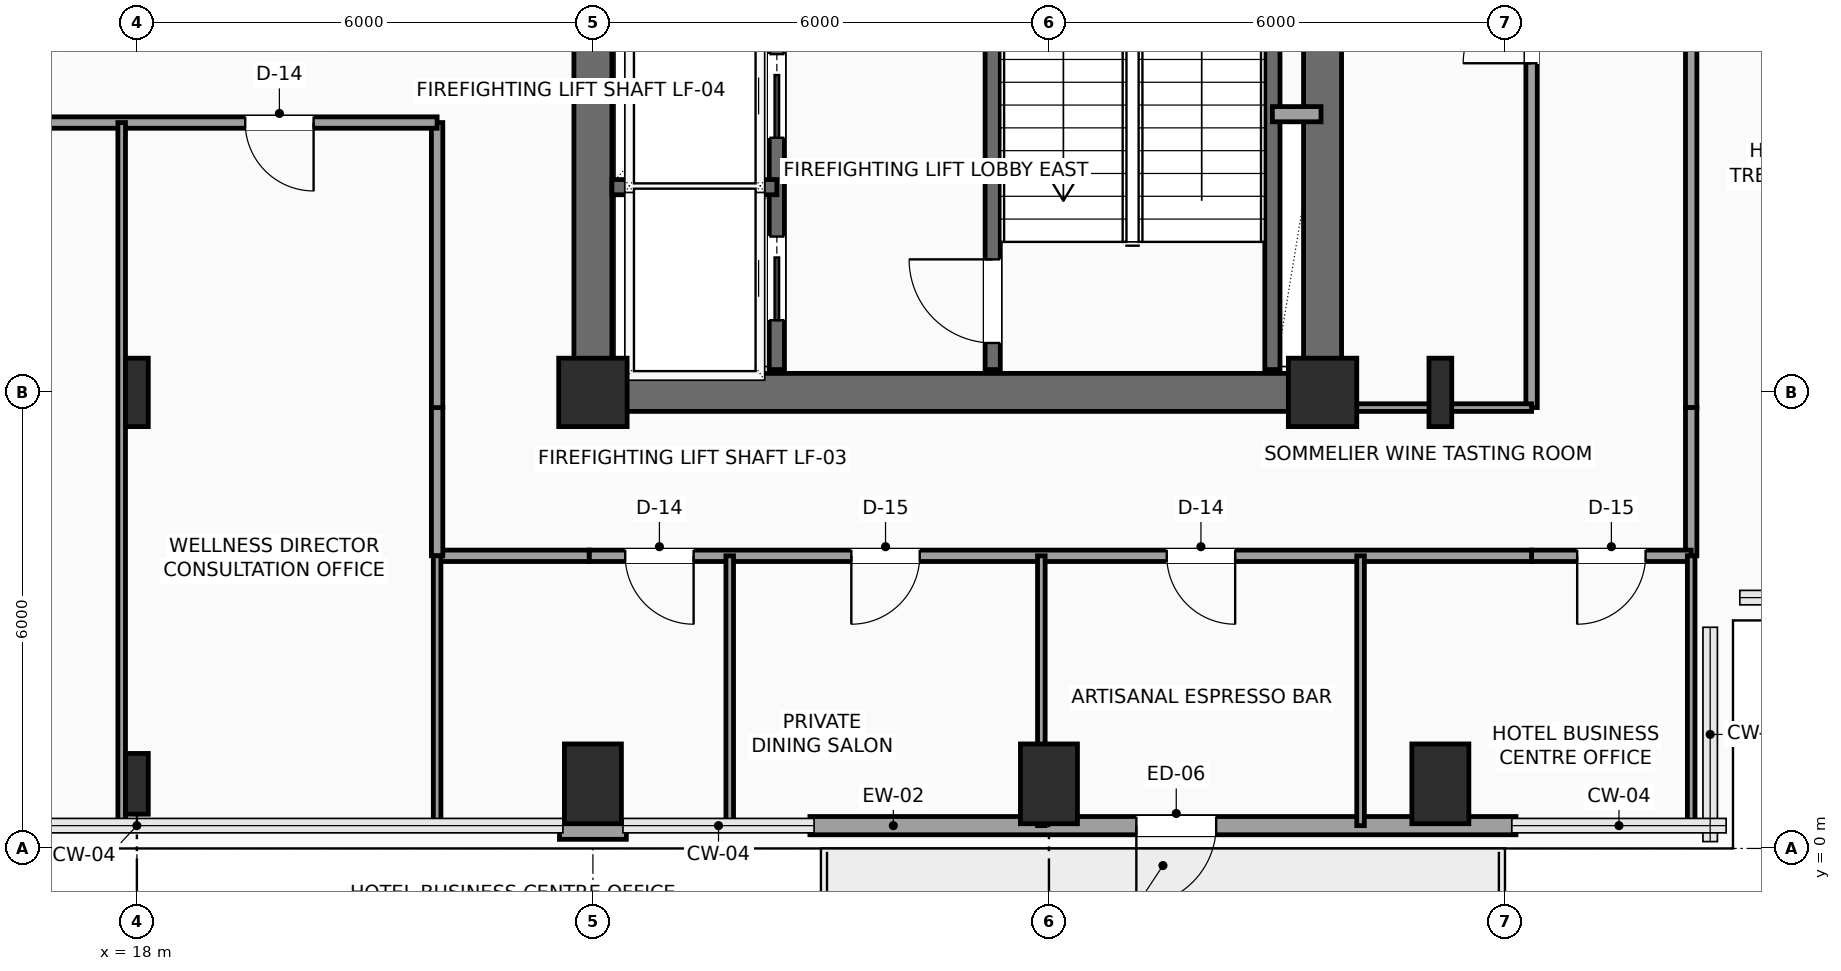
"""IFC4 building model, lengths in metres.
Left out: names, types, materials, properties, quantities, classifications, styles, units other than length and angle.
Written with IfcOpenShell. Run it as: python <this file> out.ifc"""

import sys

from ifc_helpers import new_model, si_unit, direction, frame, frame_2d, origin, origin_2d, place, context, subcontext, project, spatial, rectangle, i_section, extrude, element, fill, save


model = new_model("IFC4")
c1 = context("Model", 3, precision=1e-05, world=origin(), true_north=direction((0.0, 1.0)))
c2 = subcontext(c1, "Body", "Model", "MODEL_VIEW")
j1 = project(units=[si_unit("LENGTHUNIT", "METRE"), si_unit("PLANEANGLEUNIT", "RADIAN")], contexts=[c1])
p1 = place(None, origin())
s1 = spatial("IfcSite", under=j1, at=p1, CompositionType="ELEMENT")
p2 = place(p1, origin())
s2 = spatial("IfcBuilding", under=s1, at=p2, CompositionType="ELEMENT")
p3 = place(p2, frame((0.0, 0.0, 195.45)))
s3 = spatial("IfcBuildingStorey", under=s2, at=p3, CompositionType="ELEMENT", Elevation=195.45)
for number, where, z_axis, x_axis in (
    (1, (24.0, 6.0, 0.0), (0.0, 0.0, 1.0), (1.0, 0.0, 0.0)),
    (2, (33.6, 6.0, 0.0), (0.0, 0.0, 1.0), (1.0, 0.0, 0.0)),
):
    element("IfcColumn", number, at=place(p3, frame(where, z_axis=z_axis, x_axis=x_axis)), inside=s3, PredefinedType="COLUMN", context=c2, shape_type="SweptSolid", body=[
        extrude(rectangle(XDim=0.9, YDim=0.9, at=origin_2d()), origin(), (0.0, 0.0, 1.0), 3.75),
    ])
p4 = place(p3, frame((18.0, 0.85, 0.0), z_axis=(0.0, 0.0, 1.0), x_axis=(1.0, 0.0, 0.0)))
e3 = element("IfcColumn", 3, at=p4, inside=s3, PredefinedType="COLUMN", context=c2, shape_type="SweptSolid", body=[
    extrude(i_section(OverallWidth=0.3, OverallDepth=0.8, WebThickness=0.018, FlangeThickness=0.033, FilletRadius=0.03, at=origin_2d()), origin(), (0.0, 0.0, 1.0), 3.75),
])
p5 = place(p3, frame((18.0, 6.0, 0.0), z_axis=(0.0, 0.0, 1.0), x_axis=(1.0, 0.0, 0.0)))
e4 = element("IfcColumn", 4, at=p5, inside=s3, PredefinedType="COLUMN", context=c2, shape_type="SweptSolid", body=[
    extrude(i_section(OverallWidth=0.3, OverallDepth=0.9, WebThickness=0.019, FlangeThickness=0.035, FilletRadius=0.03, at=origin_2d()), origin(), (0.0, 0.0, 1.0), 3.75),
])
for number, where, z_axis, x_axis in (
    (5, (24.0, 0.85, 0.0), (0.0, 0.0, 1.0), (1.0, 0.0, 0.0)),
    (6, (30.0, 0.85, 0.0), (0.0, 0.0, 1.0), (1.0, 0.0, 0.0)),
    (7, (35.15, 0.85, 0.0), (0.0, 0.0, 1.0), (1.0, 0.0, 0.0)),
):
    element("IfcColumn", number, at=place(p3, frame(where, z_axis=z_axis, x_axis=x_axis)), inside=s3, PredefinedType="COLUMN", context=c2, shape_type="SweptSolid", body=[
        extrude(rectangle(XDim=0.75, YDim=1.05, at=origin_2d()), origin(), (0.0, 0.0, 1.0), 3.75),
    ])
p6 = place(p3, frame((35.15, 6.0, 0.0), z_axis=(0.0, 0.0, 1.0), x_axis=(1.0, 0.0, 0.0)))
e8 = element("IfcColumn", 8, at=p6, inside=s3, PredefinedType="COLUMN", context=c2, shape_type="SweptSolid", body=[
    extrude(i_section(OverallWidth=0.3, OverallDepth=0.9, WebThickness=0.019, FlangeThickness=0.035, FilletRadius=0.03, at=origin_2d()), origin(), (0.0, 0.0, 1.0), 3.75),
])
p7 = place(p3, frame((36.145, 0.3, 0.0), z_axis=(0.0, 0.0, 1.0), x_axis=(-1.0, 0.0, 0.0)))
e9 = element("IfcWall", 9, at=p7, inside=s3, PredefinedType="SOLIDWALL", context=c2, shape_type="SweptSolid", body=[
    extrude(rectangle(XDim=9.29, YDim=0.24, at=frame_2d((4.645, 0.0))), origin(), (0.0, 0.0, 1.0), 3.475),
])
p8 = place(p7, frame((3.945, 0.0, 0.0)))
e10 = element("IfcOpeningElement", 10, at=p8, cuts=e9, PredefinedType="OPENING", context=c2, shape_type="SweptSolid", body=[
    extrude(rectangle(XDim=1.05, YDim=2.2, at=frame_2d((0.525, 1.1))), frame((0.0, 0.13, 0.0), z_axis=(0.0, -1.0, 0.0), x_axis=(1.0, 0.0, 0.0)), (0.0, 0.0, 1.0), 0.26),
])
p9 = place(p3, frame((24.44, 0.24, 0.0), z_axis=(0.0, 0.0, 1.0), x_axis=(-1.0, 0.0, 0.0)))
e11 = element("IfcWall", 11, at=p9, inside=s3, PredefinedType="SOLIDWALL", context=c2, shape_type="SweptSolid", body=[
    extrude(rectangle(XDim=0.88, YDim=0.24, at=frame_2d((0.44, 0.0))), origin(), (0.0, 0.0, 1.0), 3.475),
])
p10 = place(p3, frame((24.0, 6.0, 0.0), z_axis=(0.0, 0.0, 1.0), x_axis=(1.0, 0.0, 0.0)))
e12 = element("IfcWall", 12, at=p10, inside=s3, PredefinedType="SHEAR", context=c2, shape_type="SweptSolid", body=[
    extrude(rectangle(XDim=9.6, YDim=0.5, at=frame_2d((4.8, 0.0))), origin(), (0.0, 0.0, 1.0), 3.475),
])
p11 = place(p3, frame((24.0, 6.0, 0.0), z_axis=(0.0, 0.0, 1.0), x_axis=(0.0, 1.0, 0.0)))
e13 = element("IfcWall", 13, at=p11, inside=s3, PredefinedType="SHEAR", context=c2, shape_type="SweptSolid", body=[
    extrude(rectangle(XDim=12.0, YDim=0.5, at=frame_2d((6.0, 0.0))), origin(), (0.0, 0.0, 1.0), 3.475),
])
p12 = place(p11, frame((7.15, 0.0, 0.0)))
e14 = element("IfcOpeningElement", 14, at=p12, cuts=e13, PredefinedType="OPENING", context=c2, shape_type="SweptSolid", body=[
    extrude(rectangle(XDim=1.6, YDim=2.3, at=frame_2d((0.8, 1.15))), frame((0.0, 0.26, 0.0), z_axis=(0.0, -1.0, 0.0), x_axis=(1.0, 0.0, 0.0)), (0.0, 0.0, 1.0), 0.52),
])
p13 = place(p3, frame((33.6, 6.0, 0.0), z_axis=(0.0, 0.0, 1.0), x_axis=(0.0, 1.0, 0.0)))
e15 = element("IfcWall", 15, at=p13, inside=s3, PredefinedType="SHEAR", context=c2, shape_type="SweptSolid", body=[
    extrude(rectangle(XDim=12.0, YDim=0.5, at=frame_2d((6.0, 0.0))), origin(), (0.0, 0.0, 1.0), 3.475),
])
p14 = place(p13, frame((10.2, 0.0, 0.0)))
e16 = element("IfcOpeningElement", 16, at=p14, cuts=e15, PredefinedType="OPENING", context=c2, shape_type="SweptSolid", body=[
    extrude(rectangle(XDim=0.9, YDim=2.15, at=frame_2d((0.45, 1.075))), frame((0.0, 0.26, 0.0), z_axis=(0.0, -1.0, 0.0), x_axis=(1.0, 0.0, 0.0)), (0.0, 0.0, 1.0), 0.52),
])
p15 = place(p3, frame((29.26, 6.3, 0.0), z_axis=(0.0, 0.0, 1.0), x_axis=(0.0, 1.0, 0.0)))
e17 = element("IfcWall", 17, at=p15, inside=s3, PredefinedType="SHEAR", context=c2, shape_type="SweptSolid", body=[
    extrude(rectangle(XDim=8.88, YDim=0.2, at=frame_2d((4.44, 0.0))), origin(), (0.0, 0.0, 1.0), 3.475),
])
p16 = place(p15, frame((0.35, 0.0, 0.0)))
e18 = element("IfcOpeningElement", 18, at=p16, cuts=e17, PredefinedType="OPENING", context=c2, shape_type="SweptSolid", body=[
    extrude(rectangle(XDim=1.1, YDim=2.2, at=frame_2d((0.55, 1.1))), frame((0.0, 0.11, 0.0), z_axis=(0.0, -1.0, 0.0), x_axis=(1.0, 0.0, 0.0)), (0.0, 0.0, 1.0), 0.22),
])
p17 = place(p3, frame((32.94, 6.3, 0.0), z_axis=(0.0, 0.0, 1.0), x_axis=(0.0, 1.0, 0.0)))
e19 = element("IfcWall", 19, at=p17, inside=s3, PredefinedType="SHEAR", context=c2, shape_type="SweptSolid", body=[
    extrude(rectangle(XDim=8.88, YDim=0.2, at=frame_2d((4.44, 0.0))), origin(), (0.0, 0.0, 1.0), 3.475),
])
p18 = place(p3, frame((26.42, 6.3, 0.0), z_axis=(0.0, 0.0, 1.0), x_axis=(0.0, 1.0, 0.0)))
e20 = element("IfcWall", 20, at=p18, inside=s3, PredefinedType="SHEAR", context=c2, shape_type="SweptSolid", body=[
    extrude(rectangle(XDim=4.95, YDim=0.2, at=frame_2d((2.475, 0.0))), origin(), (0.0, 0.0, 1.0), 3.475),
])
p19 = place(p18, frame((0.65, 0.0, 0.0)))
e21 = element("IfcOpeningElement", 21, at=p19, cuts=e20, PredefinedType="OPENING", context=c2, shape_type="SweptSolid", body=[
    extrude(rectangle(XDim=1.1, YDim=2.2, at=frame_2d((0.55, 1.1))), frame((0.0, 0.11, 0.0), z_axis=(0.0, -1.0, 0.0), x_axis=(1.0, 0.0, 0.0)), (0.0, 0.0, 1.0), 0.22),
])
p20 = place(p18, frame((3.05, 0.0, 0.0)))
e22 = element("IfcOpeningElement", 22, at=p20, cuts=e20, PredefinedType="OPENING", context=c2, shape_type="SweptSolid", body=[
    extrude(rectangle(XDim=1.1, YDim=2.2, at=frame_2d((0.55, 1.1))), frame((0.0, 0.11, 0.0), z_axis=(0.0, -1.0, 0.0), x_axis=(1.0, 0.0, 0.0)), (0.0, 0.0, 1.0), 0.22),
])
p21 = place(p3, frame((24.25, 8.7, 0.0), z_axis=(0.0, 0.0, 1.0), x_axis=(1.0, 0.0, 0.0)))
e23 = element("IfcWall", 23, at=p21, inside=s3, PredefinedType="SHEAR", context=c2, shape_type="SweptSolid", body=[
    extrude(rectangle(XDim=2.17, YDim=0.2, at=frame_2d((1.085, 0.0))), origin(), (0.0, 0.0, 1.0), 3.475),
])
p22 = place(p3, frame((32.94, 9.66, 0.0), z_axis=(0.0, 0.0, 1.0), x_axis=(1.0, 0.0, 0.0)))
e24 = element("IfcWall", 24, at=p22, inside=s3, PredefinedType="SOLIDWALL", context=c2, shape_type="SweptSolid", body=[
    extrude(rectangle(XDim=0.64, YDim=0.2, at=frame_2d((0.32, 0.0))), origin(), (0.0, 0.0, 1.0), 3.475),
])
p23 = place(p3, frame((36.35, 5.8, 0.0), z_axis=(0.0, 0.0, 1.0), x_axis=(0.0, 1.0, 0.0)))
e25 = element("IfcWall", 25, at=p23, inside=s3, PredefinedType="PARTITIONING", context=c2, shape_type="SweptSolid", body=[
    extrude(rectangle(XDim=10.08, YDim=0.15, at=frame_2d((5.04, 0.0))), origin(), (0.0, 0.0, 1.0), 3.475),
])
p24 = place(p23, frame((4.53, 0.0, 0.0)))
e26 = element("IfcOpeningElement", 26, at=p24, cuts=e25, PredefinedType="OPENING", context=c2, shape_type="SweptSolid", body=[
    extrude(rectangle(XDim=0.9, YDim=2.1, at=frame_2d((0.45, 1.05))), frame((0.0, 0.085, 0.0), z_axis=(0.0, -1.0, 0.0), x_axis=(1.0, 0.0, 0.0)), (0.0, 0.0, 1.0), 0.17),
])
p25 = place(p3, frame((38.45, 14.2, 0.0), z_axis=(0.0, 0.0, 1.0), x_axis=(0.0, -1.0, 0.0)))
e27 = element("IfcWall", 27, at=p25, inside=s3, PredefinedType="PARTITIONING", context=c2, shape_type="SweptSolid", body=[
    extrude(rectangle(XDim=8.4, YDim=0.15, at=frame_2d((4.2, 0.0))), origin(), (0.0, 0.0, 1.0), 3.475),
])
p26 = place(p3, frame((38.45, 5.8, 0.0), z_axis=(0.0, 0.0, 1.0), x_axis=(0.0, -1.0, 0.0)))
e28 = element("IfcWall", 28, at=p26, inside=s3, PredefinedType="PARTITIONING", context=c2, shape_type="SweptSolid", body=[
    extrude(rectangle(XDim=1.95, YDim=0.15, at=frame_2d((0.975, 0.0))), origin(), (0.0, 0.0, 1.0), 3.475),
])
p27 = place(p3, frame((38.45, 3.85, 0.0), z_axis=(0.0, 0.0, 1.0), x_axis=(-1.0, 0.0, 0.0)))
e29 = element("IfcWall", 29, at=p27, inside=s3, PredefinedType="PARTITIONING", context=c2, shape_type="SweptSolid", body=[
    extrude(rectangle(XDim=2.1, YDim=0.15, at=frame_2d((1.05, 0.0))), origin(), (0.0, 0.0, 1.0), 3.475),
])
p28 = place(p27, frame((0.6, 0.0, 0.0)))
e30 = element("IfcOpeningElement", 30, at=p28, cuts=e29, PredefinedType="OPENING", context=c2, shape_type="SweptSolid", body=[
    extrude(rectangle(XDim=0.9, YDim=2.1, at=frame_2d((0.45, 1.05))), frame((0.0, 0.085, 0.0), z_axis=(0.0, -1.0, 0.0), x_axis=(1.0, 0.0, 0.0)), (0.0, 0.0, 1.0), 0.17),
])
p29 = place(p3, frame((36.35, 3.85, 0.0), z_axis=(0.0, 0.0, 1.0), x_axis=(-1.0, 0.0, 0.0)))
e31 = element("IfcWall", 31, at=p29, inside=s3, PredefinedType="PARTITIONING", context=c2, shape_type="SweptSolid", body=[
    extrude(rectangle(XDim=12.4, YDim=0.15, at=frame_2d((6.2, 0.0))), origin(), (0.0, 0.0, 1.0), 3.475),
])
p30 = place(p29, frame((11.025, 0.0, 0.0)))
e32 = element("IfcOpeningElement", 32, at=p30, cuts=e31, PredefinedType="OPENING", context=c2, shape_type="SweptSolid", body=[
    extrude(rectangle(XDim=0.9, YDim=2.1, at=frame_2d((0.45, 1.05))), frame((0.0, 0.085, 0.0), z_axis=(0.0, -1.0, 0.0), x_axis=(1.0, 0.0, 0.0)), (0.0, 0.0, 1.0), 0.17),
])
p31 = place(p29, frame((8.05, 0.0, 0.0)))
e33 = element("IfcOpeningElement", 33, at=p31, cuts=e31, PredefinedType="OPENING", context=c2, shape_type="SweptSolid", body=[
    extrude(rectangle(XDim=0.9, YDim=2.1, at=frame_2d((0.45, 1.05))), frame((0.0, 0.085, 0.0), z_axis=(0.0, -1.0, 0.0), x_axis=(1.0, 0.0, 0.0)), (0.0, 0.0, 1.0), 0.17),
])
p32 = place(p29, frame((3.9, 0.0, 0.0)))
e34 = element("IfcOpeningElement", 34, at=p32, cuts=e31, PredefinedType="OPENING", context=c2, shape_type="SweptSolid", body=[
    extrude(rectangle(XDim=0.9, YDim=2.1, at=frame_2d((0.45, 1.05))), frame((0.0, 0.085, 0.0), z_axis=(0.0, -1.0, 0.0), x_axis=(1.0, 0.0, 0.0)), (0.0, 0.0, 1.0), 0.17),
])
p33 = place(p3, frame((23.95, 3.85, 0.0), z_axis=(0.0, 0.0, 1.0), x_axis=(-1.0, 0.0, 0.0)))
e35 = element("IfcWall", 35, at=p33, inside=s3, PredefinedType="PARTITIONING", context=c2, shape_type="SweptSolid", body=[
    extrude(rectangle(XDim=2.0, YDim=0.15, at=frame_2d((1.0, 0.0))), origin(), (0.0, 0.0, 1.0), 3.475),
])
p34 = place(p3, frame((21.95, 3.85, 0.0), z_axis=(0.0, 0.0, 1.0), x_axis=(0.0, 1.0, 0.0)))
e36 = element("IfcWall", 36, at=p34, inside=s3, PredefinedType="PARTITIONING", context=c2, shape_type="SweptSolid", body=[
    extrude(rectangle(XDim=1.95, YDim=0.15, at=frame_2d((0.975, 0.0))), origin(), (0.0, 0.0, 1.0), 3.475),
])
p35 = place(p3, frame((21.95, 5.8, 0.0), z_axis=(0.0, 0.0, 1.0), x_axis=(0.0, 1.0, 0.0)))
e37 = element("IfcWall", 37, at=p35, inside=s3, PredefinedType="PARTITIONING", context=c2, shape_type="SweptSolid", body=[
    extrude(rectangle(XDim=3.75, YDim=0.15, at=frame_2d((1.875, 0.0))), origin(), (0.0, 0.0, 1.0), 3.475),
])
p36 = place(p3, frame((21.95, 9.55, 0.0), z_axis=(0.0, 0.0, 1.0), x_axis=(-1.0, 0.0, 0.0)))
e38 = element("IfcWall", 38, at=p36, inside=s3, PredefinedType="PARTITIONING", context=c2, shape_type="SweptSolid", body=[
    extrude(rectangle(XDim=15.55, YDim=0.15, at=frame_2d((7.775, 0.0))), origin(), (0.0, 0.0, 1.0), 3.475),
])
p37 = place(p36, frame((14.0, 0.0, 0.0)))
e39 = element("IfcOpeningElement", 39, at=p37, cuts=e38, PredefinedType="OPENING", context=c2, shape_type="SweptSolid", body=[
    extrude(rectangle(XDim=0.9, YDim=2.1, at=frame_2d((0.45, 1.05))), frame((0.0, 0.085, 0.0), z_axis=(0.0, -1.0, 0.0), x_axis=(1.0, 0.0, 0.0)), (0.0, 0.0, 1.0), 0.17),
])
p38 = place(p36, frame((10.5, 0.0, 0.0)))
e40 = element("IfcOpeningElement", 40, at=p38, cuts=e38, PredefinedType="OPENING", context=c2, shape_type="SweptSolid", body=[
    extrude(rectangle(XDim=0.9, YDim=2.1, at=frame_2d((0.45, 1.05))), frame((0.0, 0.085, 0.0), z_axis=(0.0, -1.0, 0.0), x_axis=(1.0, 0.0, 0.0)), (0.0, 0.0, 1.0), 0.17),
])
p39 = place(p36, frame((5.9, 0.0, 0.0)))
e41 = element("IfcOpeningElement", 41, at=p39, cuts=e38, PredefinedType="OPENING", context=c2, shape_type="SweptSolid", body=[
    extrude(rectangle(XDim=0.9, YDim=2.1, at=frame_2d((0.45, 1.05))), frame((0.0, 0.085, 0.0), z_axis=(0.0, -1.0, 0.0), x_axis=(1.0, 0.0, 0.0)), (0.0, 0.0, 1.0), 0.17),
])
p40 = place(p36, frame((1.625, 0.0, 0.0)))
e42 = element("IfcOpeningElement", 42, at=p40, cuts=e38, PredefinedType="OPENING", context=c2, shape_type="SweptSolid", body=[
    extrude(rectangle(XDim=0.9, YDim=2.1, at=frame_2d((0.45, 1.05))), frame((0.0, 0.085, 0.0), z_axis=(0.0, -1.0, 0.0), x_axis=(1.0, 0.0, 0.0)), (0.0, 0.0, 1.0), 0.17),
])
for number, where, z_axis, x_axis in (
    (43, (21.95, 0.3, 0.0), (0.0, 0.0, 1.0), (0.0, 1.0, 0.0)),
    (44, (25.8, 0.3, 0.0), (0.0, 0.0, 1.0), (0.0, 1.0, 0.0)),
):
    element("IfcWall", number, at=place(p3, frame(where, z_axis=z_axis, x_axis=x_axis)), inside=s3, PredefinedType="PARTITIONING", context=c2, shape_type="SweptSolid", body=[
        extrude(rectangle(XDim=3.55, YDim=0.1, at=frame_2d((1.775, 0.0))), origin(), (0.0, 0.0, 1.0), 3.475),
    ])
p41 = place(p3, frame((29.9, 0.3, 0.0), z_axis=(0.0, 0.0, 1.0), x_axis=(0.0, 1.0, 0.0)))
e45 = element("IfcWall", 45, at=p41, inside=s3, PredefinedType="PARTITIONING", context=c2, shape_type="SweptSolid", body=[
    extrude(rectangle(XDim=3.55, YDim=0.1, at=frame_2d((1.775, 0.0))), origin(), (0.0, 0.0, 1.0), 3.167),
])
for number, where, z_axis, x_axis in (
    (46, (34.1, 0.3, 0.0), (0.0, 0.0, 1.0), (0.0, 1.0, 0.0)),
    (47, (38.45, 0.3, 0.0), (0.0, 0.0, 1.0), (0.0, 1.0, 0.0)),
):
    element("IfcWall", number, at=place(p3, frame(where, z_axis=z_axis, x_axis=x_axis)), inside=s3, PredefinedType="PARTITIONING", context=c2, shape_type="SweptSolid", body=[
        extrude(rectangle(XDim=3.55, YDim=0.1, at=frame_2d((1.775, 0.0))), origin(), (0.0, 0.0, 1.0), 3.475),
    ])
p42 = place(p3, frame((33.65, 5.8, 0.0), z_axis=(0.0, 0.0, 1.0), x_axis=(1.0, 0.0, 0.0)))
e48 = element("IfcWall", 48, at=p42, inside=s3, PredefinedType="PARTITIONING", context=c2, shape_type="SweptSolid", body=[
    extrude(rectangle(XDim=2.7, YDim=0.1, at=frame_2d((1.35, 0.0))), origin(), (0.0, 0.0, 1.0), 3.067),
])
p43 = place(p3, frame((17.8, 0.3, 0.0), z_axis=(0.0, 0.0, 1.0), x_axis=(0.0, 1.0, 0.0)))
e49 = element("IfcWall", 49, at=p43, inside=s3, PredefinedType="PARTITIONING", context=c2, shape_type="SweptSolid", body=[
    extrude(rectangle(XDim=9.25, YDim=0.1, at=frame_2d((4.625, 0.0))), origin(), (0.0, 0.0, 1.0), 3.067),
])
p44 = place(p8, origin())
e50 = element("IfcDoor", 50, at=p44, inside=s3, OperationType="SINGLE_SWING_RIGHT", PredefinedType="DOOR", context=c2, shape_type="SweptSolid", body=[
    extrude(rectangle(XDim=1.05, YDim=2.2, at=frame_2d((0.525, 1.1))), frame((0.0, 0.025, 0.0), z_axis=(0.0, -1.0, 0.0), x_axis=(1.0, 0.0, 0.0)), (0.0, 0.0, 1.0), 0.05),
])
fill(e10, e50)
p45 = place(p16, origin())
e51 = element("IfcDoor", 51, at=p45, inside=s3, OperationType="SINGLE_SWING_RIGHT", PredefinedType="DOOR", context=c2, shape_type="SweptSolid", body=[
    extrude(rectangle(XDim=1.1, YDim=2.2, at=frame_2d((0.55, 1.1))), frame((0.0, 0.025, 0.0), z_axis=(0.0, -1.0, 0.0), x_axis=(1.0, 0.0, 0.0)), (0.0, 0.0, 1.0), 0.05),
])
fill(e18, e51)
p46 = place(p19, origin())
e52 = element("IfcDoor", 52, at=p46, inside=s3, OperationType="SLIDING_TO_LEFT", PredefinedType="DOOR", context=c2, shape_type="SweptSolid", body=[
    extrude(rectangle(XDim=1.1, YDim=2.2, at=frame_2d((0.55, 1.1))), frame((0.0, 0.025, 0.0), z_axis=(0.0, -1.0, 0.0), x_axis=(1.0, 0.0, 0.0)), (0.0, 0.0, 1.0), 0.05),
])
fill(e21, e52)
p47 = place(p20, origin())
e53 = element("IfcDoor", 53, at=p47, inside=s3, OperationType="SLIDING_TO_LEFT", PredefinedType="DOOR", context=c2, shape_type="SweptSolid", body=[
    extrude(rectangle(XDim=1.1, YDim=2.2, at=frame_2d((0.55, 1.1))), frame((0.0, 0.025, 0.0), z_axis=(0.0, -1.0, 0.0), x_axis=(1.0, 0.0, 0.0)), (0.0, 0.0, 1.0), 0.05),
])
fill(e22, e53)
p48 = place(p24, origin())
e54 = element("IfcDoor", 54, at=p48, inside=s3, OperationType="SINGLE_SWING_LEFT", PredefinedType="DOOR", context=c2, shape_type="SweptSolid", body=[
    extrude(rectangle(XDim=0.9, YDim=2.1, at=frame_2d((0.45, 1.05))), frame((0.0, 0.025, 0.0), z_axis=(0.0, -1.0, 0.0), x_axis=(1.0, 0.0, 0.0)), (0.0, 0.0, 1.0), 0.05),
])
fill(e26, e54)
p49 = place(p28, origin())
e55 = element("IfcDoor", 55, at=p49, inside=s3, OperationType="SINGLE_SWING_RIGHT", PredefinedType="DOOR", context=c2, shape_type="SweptSolid", body=[
    extrude(rectangle(XDim=0.9, YDim=2.1, at=frame_2d((0.45, 1.05))), frame((0.0, 0.025, 0.0), z_axis=(0.0, -1.0, 0.0), x_axis=(1.0, 0.0, 0.0)), (0.0, 0.0, 1.0), 0.05),
])
fill(e30, e55)
p50 = place(p30, origin())
e56 = element("IfcDoor", 56, at=p50, inside=s3, OperationType="SINGLE_SWING_LEFT", PredefinedType="DOOR", context=c2, shape_type="SweptSolid", body=[
    extrude(rectangle(XDim=0.9, YDim=2.1, at=frame_2d((0.45, 1.05))), frame((0.0, 0.025, 0.0), z_axis=(0.0, -1.0, 0.0), x_axis=(1.0, 0.0, 0.0)), (0.0, 0.0, 1.0), 0.05),
])
fill(e32, e56)
p51 = place(p31, origin())
e57 = element("IfcDoor", 57, at=p51, inside=s3, OperationType="SINGLE_SWING_RIGHT", PredefinedType="DOOR", context=c2, shape_type="SweptSolid", body=[
    extrude(rectangle(XDim=0.9, YDim=2.1, at=frame_2d((0.45, 1.05))), frame((0.0, 0.025, 0.0), z_axis=(0.0, -1.0, 0.0), x_axis=(1.0, 0.0, 0.0)), (0.0, 0.0, 1.0), 0.05),
])
fill(e33, e57)
p52 = place(p32, origin())
e58 = element("IfcDoor", 58, at=p52, inside=s3, OperationType="SINGLE_SWING_LEFT", PredefinedType="DOOR", context=c2, shape_type="SweptSolid", body=[
    extrude(rectangle(XDim=0.9, YDim=2.1, at=frame_2d((0.45, 1.05))), frame((0.0, 0.025, 0.0), z_axis=(0.0, -1.0, 0.0), x_axis=(1.0, 0.0, 0.0)), (0.0, 0.0, 1.0), 0.05),
])
fill(e34, e58)
p53 = place(p40, origin())
e59 = element("IfcDoor", 59, at=p53, inside=s3, OperationType="SINGLE_SWING_LEFT", PredefinedType="DOOR", context=c2, shape_type="SweptSolid", body=[
    extrude(rectangle(XDim=0.9, YDim=2.1, at=frame_2d((0.45, 1.05))), frame((0.0, 0.025, 0.0), z_axis=(0.0, -1.0, 0.0), x_axis=(1.0, 0.0, 0.0)), (0.0, 0.0, 1.0), 0.05),
])
fill(e42, e59)
save(model, sys.argv[1])
